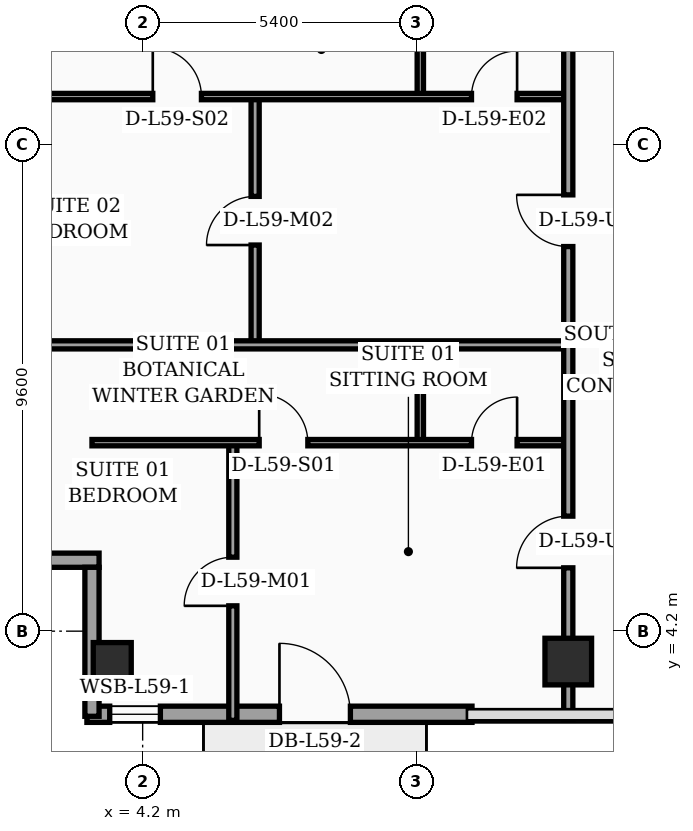
"""IFC4 building model, lengths in metres.
Left out: names, types, materials, properties, quantities, classifications, styles, units other than length and angle.
Written with IfcOpenShell. Run it as: python <this file> out.ifc"""

import sys

from ifc_helpers import new_model, si_unit, direction, frame, frame_2d, origin, origin_2d, place, context, subcontext, project, spatial, rectangle, hollow_rectangle, extrude, element, fill, save


model = new_model("IFC4")
c1 = context("Model", 3, precision=1e-05, world=origin(), true_north=direction((0.0, 1.0)))
c2 = subcontext(c1, "Body", "Model", "MODEL_VIEW")
j1 = project(units=[si_unit("LENGTHUNIT", "METRE"), si_unit("PLANEANGLEUNIT", "RADIAN")], contexts=[c1])
p1 = place(None, origin())
s1 = spatial("IfcSite", under=j1, at=p1, CompositionType="ELEMENT")
p2 = place(p1, origin())
s2 = spatial("IfcBuilding", under=s1, at=p2, CompositionType="ELEMENT")
p3 = place(p2, frame((0.0, 0.0, 239.3)))
s3 = spatial("IfcBuildingStorey", under=s2, at=p3, CompositionType="ELEMENT", Elevation=239.3)
p4 = place(p3, frame((3.6, 3.6, 0.0), z_axis=(0.0, 0.0, 1.0), x_axis=(1.0, 0.0, 0.0)))
e1 = element("IfcColumn", 1, at=p4, inside=s3, PredefinedType="COLUMN", context=c2, shape_type="SweptSolid", body=[
    extrude(hollow_rectangle(XDim=0.75, YDim=0.75, WallThickness=0.032, at=origin_2d()), origin(), (0.0, 0.0, 1.0), 4.05),
])
p5 = place(p3, frame((12.6, 3.6, 0.0), z_axis=(0.0, 0.0, 1.0), x_axis=(1.0, 0.0, 0.0)))
e2 = element("IfcColumn", 2, at=p5, inside=s3, PredefinedType="COLUMN", context=c2, shape_type="SweptSolid", body=[
    extrude(rectangle(XDim=0.92, YDim=0.92, at=origin_2d()), origin(), (0.0, 0.0, 1.0), 4.05),
])
p6 = place(p3, frame((3.1, 2.56, 0.0), z_axis=(0.0, 0.0, 1.0), x_axis=(1.0, 0.0, 0.0)))
e3 = element("IfcWall", 3, at=p6, inside=s3, PredefinedType="SOLIDWALL", context=c2, shape_type="SweptSolid", body=[
    extrude(rectangle(XDim=7.6, YDim=0.32, at=frame_2d((3.8, 0.0))), origin(), (0.0, 0.0, 1.0), 4.05),
])
p7 = place(p6, frame((0.45, 0.0, 0.75)))
e4 = element("IfcOpeningElement", 4, at=p7, cuts=e3, PredefinedType="OPENING", context=c2, shape_type="SweptSolid", body=[
    extrude(rectangle(XDim=1.0, YDim=1.6, at=frame_2d((0.5, 0.8))), frame((0.0, 0.17, 0.0), z_axis=(0.0, -1.0, 0.0), x_axis=(1.0, 0.0, 0.0)), (0.0, 0.0, 1.0), 0.34),
])
p8 = place(p6, frame((3.8, 0.0, 0.0)))
e5 = element("IfcOpeningElement", 5, at=p8, cuts=e3, PredefinedType="OPENING", context=c2, shape_type="SweptSolid", body=[
    extrude(rectangle(XDim=1.4, YDim=2.25, at=frame_2d((0.7, 1.125))), frame((0.0, 0.17, 0.0), z_axis=(0.0, -1.0, 0.0), x_axis=(1.0, 0.0, 0.0)), (0.0, 0.0, 1.0), 0.34),
])
p9 = place(p3, frame((0.12, 5.6, 0.0), z_axis=(0.0, 0.0, 1.0), x_axis=(1.0, 0.0, 0.0)))
e6 = element("IfcWall", 6, at=p9, inside=s3, PredefinedType="SOLIDWALL", context=c2, shape_type="SweptSolid", body=[
    extrude(rectangle(XDim=3.22, YDim=0.28, at=frame_2d((1.61, 0.0))), origin(), (0.0, 0.0, 1.0), 3.5),
])
p10 = place(p3, frame((3.2, 5.46, 0.0), z_axis=(0.0, 0.0, 1.0), x_axis=(0.0, -1.0, 0.0)))
e7 = element("IfcWall", 7, at=p10, inside=s3, PredefinedType="SOLIDWALL", context=c2, shape_type="SweptSolid", body=[
    extrude(rectangle(XDim=2.94, YDim=0.28, at=frame_2d((1.47, 0.0))), origin(), (0.0, 0.0, 1.0), 2.35),
])
p11 = place(p3, frame((9.68, 7.92, 0.0), z_axis=(0.0, 0.0, 1.0), x_axis=(0.0, 1.0, 0.0)))
e8 = element("IfcWall", 8, at=p11, inside=s3, PredefinedType="PARTITIONING", context=c2, shape_type="SweptSolid", body=[
    extrude(rectangle(XDim=1.93, YDim=0.125, at=frame_2d((0.965, 0.0))), origin(), (0.0, 0.0, 1.0), 3.6),
])
p12 = place(p3, frame((5.98, 2.44, 0.0), z_axis=(0.0, 0.0, 1.0), x_axis=(0.0, 1.0, 0.0)))
e9 = element("IfcWall", 9, at=p12, inside=s3, PredefinedType="PARTITIONING", context=c2, shape_type="SweptSolid", body=[
    extrude(rectangle(XDim=5.48, YDim=0.16, at=frame_2d((2.74, 0.0))), origin(), (0.0, 0.0, 1.0), 2.35),
])
p13 = place(p12, frame((2.26, 0.0, 0.0)))
e10 = element("IfcOpeningElement", 10, at=p13, cuts=e9, PredefinedType="OPENING", context=c2, shape_type="SweptSolid", body=[
    extrude(rectangle(XDim=0.96, YDim=2.2, at=frame_2d((0.48, 1.1))), frame((0.0, 0.09, 0.0), z_axis=(0.0, -1.0, 0.0), x_axis=(1.0, 0.0, 0.0)), (0.0, 0.0, 1.0), 0.18),
])
p14 = place(p3, frame((3.2, 7.92, 0.0), z_axis=(0.0, 0.0, 1.0), x_axis=(1.0, 0.0, 0.0)))
e11 = element("IfcWall", 11, at=p14, inside=s3, PredefinedType="PARTITIONING", context=c2, shape_type="SweptSolid", body=[
    extrude(rectangle(XDim=9.4, YDim=0.125, at=frame_2d((4.7, 0.0))), origin(), (0.0, 0.0, 1.0), 3.5),
])
p15 = place(p14, frame((3.3, 0.0, 0.0)))
e12 = element("IfcOpeningElement", 12, at=p15, cuts=e11, PredefinedType="OPENING", context=c2, shape_type="SweptSolid", body=[
    extrude(rectangle(XDim=0.96, YDim=2.2, at=frame_2d((0.48, 1.1))), frame((0.0, 0.073, 0.0), z_axis=(0.0, -1.0, 0.0), x_axis=(1.0, 0.0, 0.0)), (0.0, 0.0, 1.0), 0.145),
])
p16 = place(p14, frame((7.49, 0.0, 0.0)))
e13 = element("IfcOpeningElement", 13, at=p16, cuts=e11, PredefinedType="OPENING", context=c2, shape_type="SweptSolid", body=[
    extrude(rectangle(XDim=0.9, YDim=2.15, at=frame_2d((0.45, 1.075))), frame((0.0, 0.073, 0.0), z_axis=(0.0, -1.0, 0.0), x_axis=(1.0, 0.0, 0.0)), (0.0, 0.0, 1.0), 0.145),
])
p17 = place(p3, frame((9.68, 14.75, 0.0), z_axis=(0.0, 0.0, 1.0), x_axis=(0.0, 1.0, 0.0)))
e14 = element("IfcWall", 14, at=p17, inside=s3, PredefinedType="PARTITIONING", context=c2, shape_type="SweptSolid", body=[
    extrude(rectangle(XDim=2.05, YDim=0.125, at=frame_2d((1.025, 0.0))), origin(), (0.0, 0.0, 1.0), 4.05),
])
p18 = place(p3, frame((6.42, 9.85, 0.0), z_axis=(0.0, 0.0, 1.0), x_axis=(0.0, 1.0, 0.0)))
e15 = element("IfcWall", 15, at=p18, inside=s3, PredefinedType="PARTITIONING", context=c2, shape_type="SweptSolid", body=[
    extrude(rectangle(XDim=4.9, YDim=0.16, at=frame_2d((2.45, 0.0))), origin(), (0.0, 0.0, 1.0), 3.65),
])
p19 = place(p18, frame((1.97, 0.0, 0.0)))
e16 = element("IfcOpeningElement", 16, at=p19, cuts=e15, PredefinedType="OPENING", context=c2, shape_type="SweptSolid", body=[
    extrude(rectangle(XDim=0.96, YDim=2.2, at=frame_2d((0.48, 1.1))), frame((0.0, 0.09, 0.0), z_axis=(0.0, -1.0, 0.0), x_axis=(1.0, 0.0, 0.0)), (0.0, 0.0, 1.0), 0.18),
])
p20 = place(p3, frame((0.08, 14.75, 0.0), z_axis=(0.0, 0.0, 1.0), x_axis=(1.0, 0.0, 0.0)))
e17 = element("IfcWall", 17, at=p20, inside=s3, PredefinedType="PARTITIONING", context=c2, shape_type="SweptSolid", body=[
    extrude(rectangle(XDim=12.52, YDim=0.125, at=frame_2d((6.26, 0.0))), origin(), (0.0, 0.0, 1.0), 3.5),
])
p21 = place(p20, frame((4.32, 0.0, 0.0)))
e18 = element("IfcOpeningElement", 18, at=p21, cuts=e17, PredefinedType="OPENING", context=c2, shape_type="SweptSolid", body=[
    extrude(rectangle(XDim=0.96, YDim=2.2, at=frame_2d((0.48, 1.1))), frame((0.0, 0.073, 0.0), z_axis=(0.0, -1.0, 0.0), x_axis=(1.0, 0.0, 0.0)), (0.0, 0.0, 1.0), 0.145),
])
p22 = place(p20, frame((10.61, 0.0, 0.0)))
e19 = element("IfcOpeningElement", 19, at=p22, cuts=e17, PredefinedType="OPENING", context=c2, shape_type="SweptSolid", body=[
    extrude(rectangle(XDim=0.9, YDim=2.15, at=frame_2d((0.45, 1.075))), frame((0.0, 0.073, 0.0), z_axis=(0.0, -1.0, 0.0), x_axis=(1.0, 0.0, 0.0)), (0.0, 0.0, 1.0), 0.145),
])
p23 = place(p3, frame((0.08, 9.85, 0.0), z_axis=(0.0, 0.0, 1.0), x_axis=(1.0, 0.0, 0.0)))
e20 = element("IfcWall", 20, at=p23, inside=s3, PredefinedType="PARTITIONING", context=c2, shape_type="SweptSolid", body=[
    extrude(rectangle(XDim=12.52, YDim=0.16, at=frame_2d((6.26, 0.0))), origin(), (0.0, 0.0, 1.0), 3.5),
])
p24 = place(p3, frame((12.6, 2.44, 0.0), z_axis=(0.0, 0.0, 1.0), x_axis=(0.0, 1.0, 0.0)))
e21 = element("IfcWall", 21, at=p24, inside=s3, PredefinedType="PARTITIONING", context=c2, shape_type="SweptSolid", body=[
    extrude(rectangle(XDim=14.36, YDim=0.18, at=frame_2d((7.18, 0.0))), origin(), (0.0, 0.0, 1.0), 2.35),
])
p25 = place(p24, frame((3.01, 0.0, 0.0)))
e22 = element("IfcOpeningElement", 22, at=p25, cuts=e21, PredefinedType="OPENING", context=c2, shape_type="SweptSolid", body=[
    extrude(rectangle(XDim=1.02, YDim=2.2, at=frame_2d((0.51, 1.1))), frame((0.0, 0.1, 0.0), z_axis=(0.0, -1.0, 0.0), x_axis=(1.0, 0.0, 0.0)), (0.0, 0.0, 1.0), 0.2),
])
p26 = place(p24, frame((9.35, 0.0, 0.0)))
e23 = element("IfcOpeningElement", 23, at=p26, cuts=e21, PredefinedType="OPENING", context=c2, shape_type="SweptSolid", body=[
    extrude(rectangle(XDim=1.02, YDim=2.2, at=frame_2d((0.51, 1.1))), frame((0.0, 0.1, 0.0), z_axis=(0.0, -1.0, 0.0), x_axis=(1.0, 0.0, 0.0)), (0.0, 0.0, 1.0), 0.2),
])
p27 = place(p7, origin())
e24 = element("IfcWindow", 24, at=p27, inside=s3, PartitioningType="SINGLE_PANEL", PredefinedType="WINDOW", context=c2, shape_type="SweptSolid", body=[
    extrude(rectangle(XDim=1.0, YDim=1.6, at=frame_2d((0.5, 0.8))), frame((0.0, 0.03, 0.0), z_axis=(0.0, -1.0, 0.0), x_axis=(1.0, 0.0, 0.0)), (0.0, 0.0, 1.0), 0.06),
])
fill(e4, e24)
p28 = place(p8, origin())
e25 = element("IfcDoor", 25, at=p28, inside=s3, OperationType="SINGLE_SWING_LEFT", PredefinedType="DOOR", context=c2, shape_type="SweptSolid", body=[
    extrude(rectangle(XDim=1.4, YDim=2.25, at=frame_2d((0.7, 1.125))), frame((0.0, 0.025, 0.0), z_axis=(0.0, -1.0, 0.0), x_axis=(1.0, 0.0, 0.0)), (0.0, 0.0, 1.0), 0.05),
])
fill(e5, e25)
p29 = place(p13, origin())
e26 = element("IfcDoor", 26, at=p29, inside=s3, OperationType="SINGLE_SWING_LEFT", PredefinedType="DOOR", context=c2, shape_type="SweptSolid", body=[
    extrude(rectangle(XDim=0.96, YDim=2.2, at=frame_2d((0.48, 1.1))), frame((0.0, 0.025, 0.0), z_axis=(0.0, -1.0, 0.0), x_axis=(1.0, 0.0, 0.0)), (0.0, 0.0, 1.0), 0.05),
])
fill(e10, e26)
p30 = place(p15, origin())
e27 = element("IfcDoor", 27, at=p30, inside=s3, OperationType="SINGLE_SWING_LEFT", PredefinedType="DOOR", context=c2, shape_type="SweptSolid", body=[
    extrude(rectangle(XDim=0.96, YDim=2.2, at=frame_2d((0.48, 1.1))), frame((0.0, 0.025, 0.0), z_axis=(0.0, -1.0, 0.0), x_axis=(1.0, 0.0, 0.0)), (0.0, 0.0, 1.0), 0.05),
])
fill(e12, e27)
p31 = place(p16, origin())
e28 = element("IfcDoor", 28, at=p31, inside=s3, OperationType="SINGLE_SWING_RIGHT", PredefinedType="DOOR", context=c2, shape_type="SweptSolid", body=[
    extrude(rectangle(XDim=0.9, YDim=2.15, at=frame_2d((0.45, 1.075))), frame((0.0, 0.025, 0.0), z_axis=(0.0, -1.0, 0.0), x_axis=(1.0, 0.0, 0.0)), (0.0, 0.0, 1.0), 0.05),
])
fill(e13, e28)
p32 = place(p19, origin())
e29 = element("IfcDoor", 29, at=p32, inside=s3, OperationType="SINGLE_SWING_LEFT", PredefinedType="DOOR", context=c2, shape_type="SweptSolid", body=[
    extrude(rectangle(XDim=0.96, YDim=2.2, at=frame_2d((0.48, 1.1))), frame((0.0, 0.025, 0.0), z_axis=(0.0, -1.0, 0.0), x_axis=(1.0, 0.0, 0.0)), (0.0, 0.0, 1.0), 0.05),
])
fill(e16, e29)
p33 = place(p21, origin())
e30 = element("IfcDoor", 30, at=p33, inside=s3, OperationType="SINGLE_SWING_LEFT", PredefinedType="DOOR", context=c2, shape_type="SweptSolid", body=[
    extrude(rectangle(XDim=0.96, YDim=2.2, at=frame_2d((0.48, 1.1))), frame((0.0, 0.025, 0.0), z_axis=(0.0, -1.0, 0.0), x_axis=(1.0, 0.0, 0.0)), (0.0, 0.0, 1.0), 0.05),
])
fill(e18, e30)
p34 = place(p22, origin())
e31 = element("IfcDoor", 31, at=p34, inside=s3, OperationType="SINGLE_SWING_RIGHT", PredefinedType="DOOR", context=c2, shape_type="SweptSolid", body=[
    extrude(rectangle(XDim=0.9, YDim=2.15, at=frame_2d((0.45, 1.075))), frame((0.0, 0.025, 0.0), z_axis=(0.0, -1.0, 0.0), x_axis=(1.0, 0.0, 0.0)), (0.0, 0.0, 1.0), 0.05),
])
fill(e19, e31)
p35 = place(p25, origin())
e32 = element("IfcDoor", 32, at=p35, inside=s3, OperationType="SINGLE_SWING_LEFT", PredefinedType="DOOR", context=c2, shape_type="SweptSolid", body=[
    extrude(rectangle(XDim=1.02, YDim=2.2, at=frame_2d((0.51, 1.1))), frame((0.0, 0.025, 0.0), z_axis=(0.0, -1.0, 0.0), x_axis=(1.0, 0.0, 0.0)), (0.0, 0.0, 1.0), 0.05),
])
fill(e22, e32)
p36 = place(p26, origin())
e33 = element("IfcDoor", 33, at=p36, inside=s3, OperationType="SINGLE_SWING_RIGHT", PredefinedType="DOOR", context=c2, shape_type="SweptSolid", body=[
    extrude(rectangle(XDim=1.02, YDim=2.2, at=frame_2d((0.51, 1.1))), frame((0.0, 0.025, 0.0), z_axis=(0.0, -1.0, 0.0), x_axis=(1.0, 0.0, 0.0)), (0.0, 0.0, 1.0), 0.05),
])
fill(e23, e33)
save(model, sys.argv[1])
